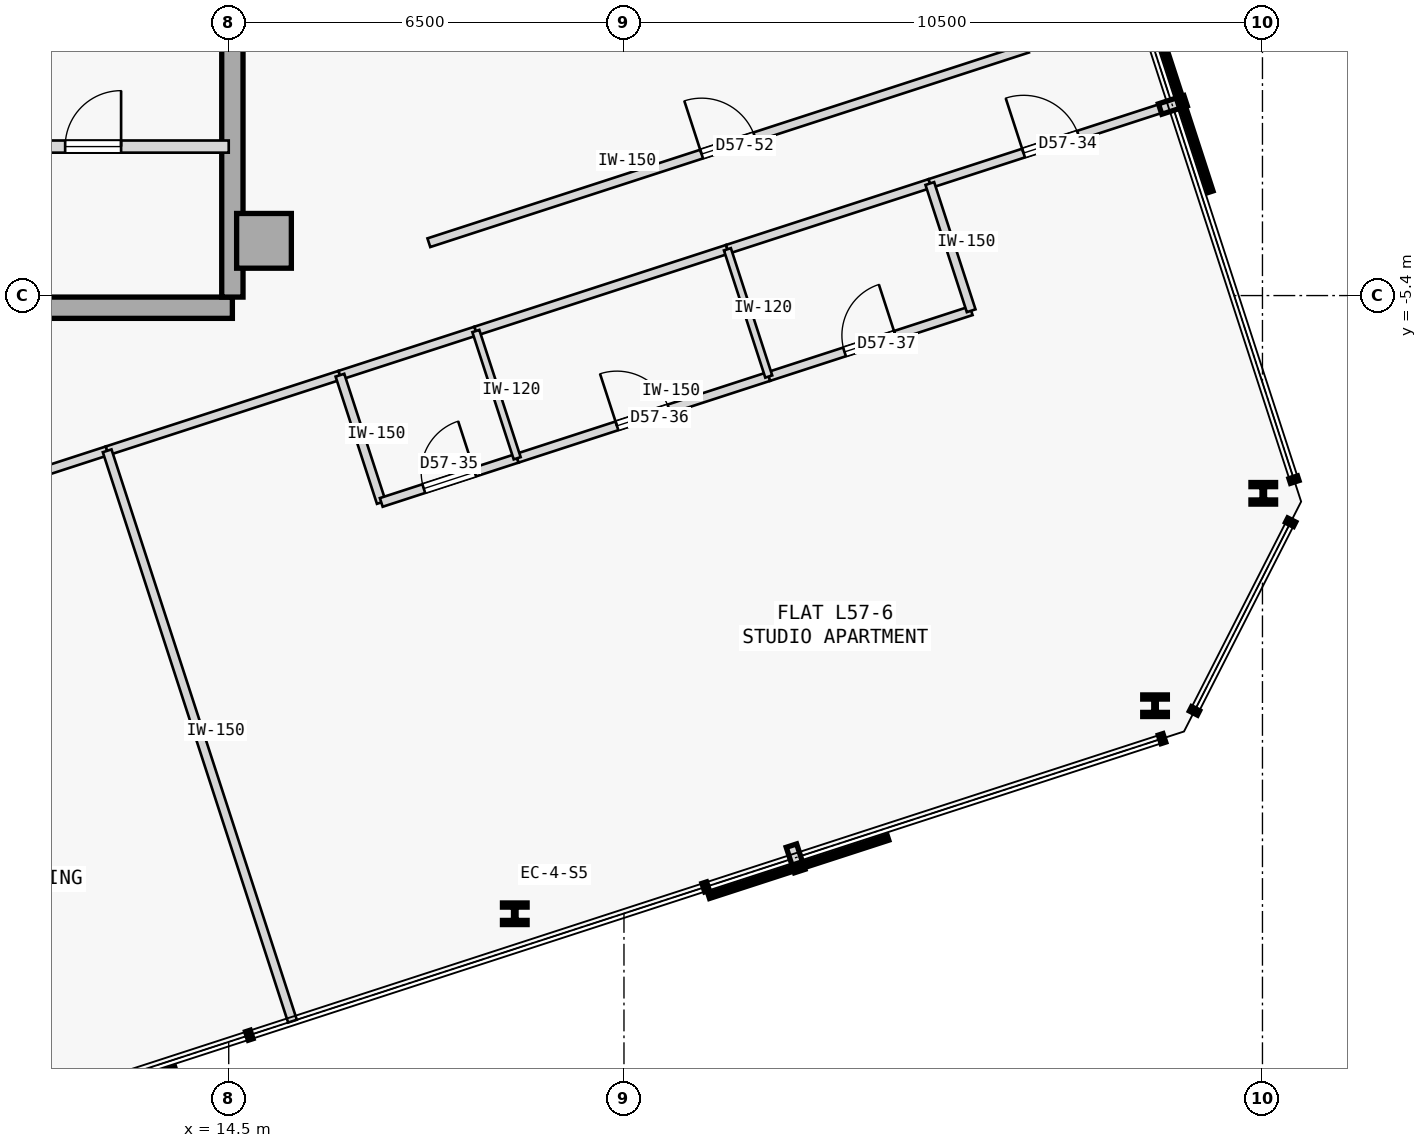
"""IFC4 building model, lengths in metres.
Left out: names, types, materials, properties, quantities, classifications, styles, units other than length and angle.
Written with IfcOpenShell. Run it as: python <this file> out.ifc"""

import sys

from ifc_helpers import new_model, si_unit, direction, frame, frame_2d, origin, origin_2d, place, context, subcontext, project, spatial, rectangle, i_section, extrude, element, fill, save


model = new_model("IFC4")
c1 = context("Model", 3, precision=1e-05, world=origin(), true_north=direction((0.0, 1.0)))
c2 = subcontext(c1, "Body", "Model", "MODEL_VIEW")
j1 = project(units=[si_unit("LENGTHUNIT", "METRE"), si_unit("PLANEANGLEUNIT", "RADIAN")], contexts=[c1])
p1 = place(None, origin())
s1 = spatial("IfcSite", under=j1, at=p1, CompositionType="ELEMENT")
p2 = place(p1, origin())
s2 = spatial("IfcBuilding", under=s1, at=p2, CompositionType="ELEMENT")
p3 = place(p2, frame((0.0, 0.0, 217.6)))
s3 = spatial("IfcBuildingStorey", under=s2, at=p3, CompositionType="ELEMENT", Elevation=217.6)
p4 = place(p3, frame((15.08, -4.5, 0.0), z_axis=(0.0, 0.0, 1.0), x_axis=(1.0, 0.0, 0.0)))
e1 = element("IfcColumn", 1, at=p4, inside=s3, PredefinedType="COLUMN", context=c2, shape_type="SweptSolid", body=[
    extrude(rectangle(XDim=0.9, YDim=0.9, at=origin_2d()), origin(), (0.0, 0.0, 1.0), 3.35),
])
p5 = place(p3, frame((3.7, -5.6, 0.0), z_axis=(0.0, 0.0, 1.0), x_axis=(1.0, 0.0, 0.0)))
e2 = element("IfcWall", 2, at=p5, inside=s3, PredefinedType="SHEAR", context=c2, shape_type="SweptSolid", body=[
    extrude(rectangle(XDim=10.86, YDim=0.35, at=frame_2d((5.43, 0.0))), origin(), (0.0, 0.0, 1.0), 3.125),
])
p6 = place(p3, frame((14.56, -5.425, 0.0), z_axis=(0.0, 0.0, 1.0), x_axis=(0.0, 1.0, 0.0)))
e3 = element("IfcWall", 3, at=p6, inside=s3, PredefinedType="SHEAR", context=c2, shape_type="SweptSolid", body=[
    extrude(rectangle(XDim=10.85, YDim=0.35, at=frame_2d((5.425, 0.0))), origin(), (0.0, 0.0, 1.0), 3.125),
])
for number, where, z_axis, x_axis in (
    (4, (19.204, -15.566, 0.0), (0.0, 0.0, 1.0), (1.0, 0.0, 0.0)),
    (5, (29.734, -12.145, 0.0), (0.0, 0.0, 1.0), (1.0, 0.0, 0.0)),
    (6, (31.513, -8.652, 0.0), (0.0, 0.0, 1.0), (1.0, 0.0, 0.0)),
):
    element("IfcColumn", number, at=place(p3, frame(where, z_axis=z_axis, x_axis=x_axis)), inside=s3, PredefinedType="COLUMN", context=c2, shape_type="SweptSolid", body=[
        extrude(i_section(OverallWidth=0.405, OverallDepth=0.355, WebThickness=0.042, FlangeThickness=0.068, FilletRadius=0.015, at=origin_2d()), origin(), (0.0, 0.0, 1.0), 3.35),
    ])
p7 = place(p3, frame((3.7, -2.95, 0.0), z_axis=(0.0, 0.0, 1.0), x_axis=(1.0, 0.0, 0.0)))
e7 = element("IfcWall", 7, at=p7, inside=s3, PredefinedType="STANDARD", context=c2, shape_type="SweptSolid", body=[
    extrude(rectangle(XDim=10.8, YDim=0.2, at=frame_2d((5.4, 0.0))), origin(), (0.0, 0.0, 1.0), 3.125),
])
p8 = place(p7, frame((0.53, 0.0, 0.0)))
e8 = element("IfcOpeningElement", 8, at=p8, cuts=e7, PredefinedType="OPENING", context=c2, shape_type="SweptSolid", body=[
    extrude(rectangle(XDim=1.1, YDim=2.15, at=frame_2d((0.55, 1.075))), frame((0.0, 0.11, 0.0), z_axis=(0.0, -1.0, 0.0), x_axis=(1.0, 0.0, 0.0)), (0.0, 0.0, 1.0), 0.22),
])
p9 = place(p7, frame((3.79, 0.0, 0.0)))
e9 = element("IfcOpeningElement", 9, at=p9, cuts=e7, PredefinedType="OPENING", context=c2, shape_type="SweptSolid", body=[
    extrude(rectangle(XDim=0.92, YDim=2.15, at=frame_2d((0.46, 1.075))), frame((0.0, 0.11, 0.0), z_axis=(0.0, -1.0, 0.0), x_axis=(1.0, 0.0, 0.0)), (0.0, 0.0, 1.0), 0.22),
])
p10 = place(p7, frame((8.11, 0.0, 0.0)))
e10 = element("IfcOpeningElement", 10, at=p10, cuts=e7, PredefinedType="OPENING", context=c2, shape_type="SweptSolid", body=[
    extrude(rectangle(XDim=0.92, YDim=2.15, at=frame_2d((0.46, 1.075))), frame((0.0, 0.11, 0.0), z_axis=(0.0, -1.0, 0.0), x_axis=(1.0, 0.0, 0.0)), (0.0, 0.0, 1.0), 0.22),
])
p11 = place(p3, frame((6.926, -9.765, 0.0), z_axis=(0.0, 0.0, 1.0), x_axis=(0.951054878391, 0.30902203528, 0.0)))
e11 = element("IfcWall", 11, at=p11, inside=s3, PredefinedType="PARTITIONING", context=c2, shape_type="SweptSolid", body=[
    extrude(rectangle(XDim=5.862, YDim=0.15, at=frame_2d((2.931, 0.0))), origin(), (0.0, 0.0, 1.0), 3.125),
])
p12 = place(p11, frame((2.456, 0.0, 0.0)))
e12 = element("IfcOpeningElement", 12, at=p12, cuts=e11, PredefinedType="OPENING", context=c2, shape_type="SweptSolid", body=[
    extrude(rectangle(XDim=0.95, YDim=2.15, at=frame_2d((0.475, 1.075))), frame((0.0, 0.085, 0.0), z_axis=(0.0, -1.0, 0.0), x_axis=(1.0, 0.0, 0.0)), (0.0, 0.0, 1.0), 0.17),
])
p13 = place(p3, frame((12.501, -7.953, 0.0), z_axis=(0.0, 0.0, 1.0), x_axis=(0.951046103464, 0.309049039936, 0.0)))
e13 = element("IfcWall", 13, at=p13, inside=s3, PredefinedType="PARTITIONING", context=c2, shape_type="SweptSolid", body=[
    extrude(rectangle(XDim=4.025, YDim=0.15, at=frame_2d((2.012, 0.0))), origin(), (0.0, 0.0, 1.0), 3.125),
])
p14 = place(p3, frame((26.03, -3.557, 0.0), z_axis=(0.0, 0.0, 1.0), x_axis=(0.951050334989, 0.309036017832, 0.0)))
e14 = element("IfcWall", 14, at=p14, inside=s3, PredefinedType="PARTITIONING", context=c2, shape_type="SweptSolid", body=[
    extrude(rectangle(XDim=4.191, YDim=0.15, at=frame_2d((2.095, 0.0))), origin(), (0.0, 0.0, 1.0), 3.125),
])
p15 = place(p14, frame((1.621, 0.0, 0.0)))
e15 = element("IfcOpeningElement", 15, at=p15, cuts=e14, PredefinedType="OPENING", context=c2, shape_type="SweptSolid", body=[
    extrude(rectangle(XDim=0.95, YDim=2.15, at=frame_2d((0.475, 1.075))), frame((0.0, 0.085, 0.0), z_axis=(0.0, -1.0, 0.0), x_axis=(1.0, 0.0, 0.0)), (0.0, 0.0, 1.0), 0.17),
])
p16 = place(p3, frame((16.329, -6.709, 0.0), z_axis=(0.0, 0.0, 1.0), x_axis=(0.951076048914, 0.308956872689, 0.0)))
e16 = element("IfcWall", 16, at=p16, inside=s3, PredefinedType="PARTITIONING", context=c2, shape_type="SweptSolid", body=[
    extrude(rectangle(XDim=2.35, YDim=0.15, at=frame_2d((1.175, 0.0))), origin(), (0.0, 0.0, 1.0), 3.125),
])
p17 = place(p3, frame((18.564, -5.983, 0.0), z_axis=(0.0, 0.0, 1.0), x_axis=(0.951052627573, 0.309028962374, 0.0)))
e17 = element("IfcWall", 17, at=p17, inside=s3, PredefinedType="PARTITIONING", context=c2, shape_type="SweptSolid", body=[
    extrude(rectangle(XDim=4.35, YDim=0.15, at=frame_2d((2.175, 0.0))), origin(), (0.0, 0.0, 1.0), 3.125),
])
p18 = place(p3, frame((22.701, -4.639, 0.0), z_axis=(0.0, 0.0, 1.0), x_axis=(0.951062257173, 0.308999325213, 0.0)))
e18 = element("IfcWall", 18, at=p18, inside=s3, PredefinedType="PARTITIONING", context=c2, shape_type="SweptSolid", body=[
    extrude(rectangle(XDim=3.5, YDim=0.15, at=frame_2d((1.75, 0.0))), origin(), (0.0, 0.0, 1.0), 3.125),
])
p19 = place(p3, frame((17.791, -4.531, 0.0), z_axis=(0.0, 0.0, 1.0), x_axis=(0.951056769902, 0.309016213852, 0.0)))
e19 = element("IfcWall", 19, at=p19, inside=s3, PredefinedType="PARTITIONING", context=c2, shape_type="SweptSolid", body=[
    extrude(rectangle(XDim=10.352, YDim=0.15, at=frame_2d((5.176, 0.0))), origin(), (0.0, 0.0, 1.0), 3.125),
])
p20 = place(p19, frame((4.716, 0.0, 0.0)))
e20 = element("IfcOpeningElement", 20, at=p20, cuts=e19, PredefinedType="OPENING", context=c2, shape_type="SweptSolid", body=[
    extrude(rectangle(XDim=0.92, YDim=2.15, at=frame_2d((0.46, 1.075))), frame((0.0, 0.085, 0.0), z_axis=(0.0, -1.0, 0.0), x_axis=(1.0, 0.0, 0.0)), (0.0, 0.0, 1.0), 0.17),
])
p21 = place(p3, frame((15.548, -17.333, 0.0), z_axis=(0.0, 0.0, 1.0), x_axis=(-0.308999867152, 0.951062081097, 0.0)))
e21 = element("IfcWall", 21, at=p21, inside=s3, PredefinedType="PARTITIONING", context=c2, shape_type="SweptSolid", body=[
    extrude(rectangle(XDim=9.862, YDim=0.15, at=frame_2d((4.931, 0.0))), origin(), (0.0, 0.0, 1.0), 3.125),
])
p22 = place(p3, frame((17.009, -8.802, 0.0), z_axis=(0.0, 0.0, 1.0), x_axis=(-0.309028364152, 0.951052821956, 0.0)))
e22 = element("IfcWall", 22, at=p22, inside=s3, PredefinedType="PARTITIONING", context=c2, shape_type="SweptSolid", body=[
    extrude(rectangle(XDim=2.2, YDim=0.15, at=frame_2d((1.1, 0.0))), origin(), (0.0, 0.0, 1.0), 3.125),
])
p23 = place(p3, frame((17.009, -8.802, 0.0), z_axis=(0.0, 0.0, 1.0), x_axis=(0.951035595692, 0.309081373955, 0.0)))
e23 = element("IfcWall", 23, at=p23, inside=s3, PredefinedType="PARTITIONING", context=c2, shape_type="SweptSolid", body=[
    extrude(rectangle(XDim=2.35, YDim=0.15, at=frame_2d((1.175, 0.0))), origin(), (0.0, 0.0, 1.0), 3.125),
])
p24 = place(p23, frame((0.735, 0.0, 0.0)))
e24 = element("IfcOpeningElement", 24, at=p24, cuts=e23, PredefinedType="OPENING", context=c2, shape_type="SweptSolid", body=[
    extrude(rectangle(XDim=0.88, YDim=2.15, at=frame_2d((0.44, 1.075))), frame((0.0, 0.085, 0.0), z_axis=(0.0, -1.0, 0.0), x_axis=(1.0, 0.0, 0.0)), (0.0, 0.0, 1.0), 0.17),
])
p25 = place(p3, frame((19.244, -8.075, 0.0), z_axis=(0.0, 0.0, 1.0), x_axis=(0.951057987102, 0.309012467661, 0.0)))
e25 = element("IfcWall", 25, at=p25, inside=s3, PredefinedType="PARTITIONING", context=c2, shape_type="SweptSolid", body=[
    extrude(rectangle(XDim=4.35, YDim=0.15, at=frame_2d((2.175, 0.0))), origin(), (0.0, 0.0, 1.0), 3.125),
])
p26 = place(p25, frame((1.725, 0.0, 0.0)))
e26 = element("IfcOpeningElement", 26, at=p26, cuts=e25, PredefinedType="OPENING", context=c2, shape_type="SweptSolid", body=[
    extrude(rectangle(XDim=0.9, YDim=2.15, at=frame_2d((0.45, 1.075))), frame((0.0, 0.085, 0.0), z_axis=(0.0, -1.0, 0.0), x_axis=(1.0, 0.0, 0.0)), (0.0, 0.0, 1.0), 0.17),
])
p27 = place(p3, frame((23.381, -6.731, 0.0), z_axis=(0.0, 0.0, 1.0), x_axis=(0.951055596592, 0.309019824916, 0.0)))
e27 = element("IfcWall", 27, at=p27, inside=s3, PredefinedType="PARTITIONING", context=c2, shape_type="SweptSolid", body=[
    extrude(rectangle(XDim=3.5, YDim=0.15, at=frame_2d((1.75, 0.0))), origin(), (0.0, 0.0, 1.0), 3.125),
])
p28 = place(p27, frame((1.31, 0.0, 0.0)))
e28 = element("IfcOpeningElement", 28, at=p28, cuts=e27, PredefinedType="OPENING", context=c2, shape_type="SweptSolid", body=[
    extrude(rectangle(XDim=0.88, YDim=2.15, at=frame_2d((0.44, 1.075))), frame((0.0, 0.085, 0.0), z_axis=(0.0, -1.0, 0.0), x_axis=(1.0, 0.0, 0.0)), (0.0, 0.0, 1.0), 0.17),
])
p29 = place(p3, frame((26.709, -5.65, 0.0), z_axis=(0.0, 0.0, 1.0), x_axis=(-0.308960600764, 0.951074837842, 0.0)))
e29 = element("IfcWall", 29, at=p29, inside=s3, PredefinedType="PARTITIONING", context=c2, shape_type="SweptSolid", body=[
    extrude(rectangle(XDim=2.2, YDim=0.15, at=frame_2d((1.1, 0.0))), origin(), (0.0, 0.0, 1.0), 3.125),
])
for number, where, z_axis, x_axis in (
    (30, (19.244, -8.075, 0.0), (0.0, 0.0, 1.0), (-0.309, 0.951, 0.0)),
    (31, (23.381, -6.731, 0.0), (0.0, 0.0, 1.0), (-0.309, 0.951, 0.0)),
):
    element("IfcWall", number, at=place(p3, frame(where, z_axis=z_axis, x_axis=x_axis)), inside=s3, PredefinedType="PARTITIONING", context=c2, shape_type="SweptSolid", body=[
        extrude(rectangle(XDim=2.2, YDim=0.12, at=frame_2d((1.1, 0.0))), origin(), (0.0, 0.0, 1.0), 3.125),
    ])
p30 = place(p10, origin())
e32 = element("IfcDoor", 32, at=p30, inside=s3, OperationType="SINGLE_SWING_RIGHT", PredefinedType="DOOR", context=c2, shape_type="SweptSolid", body=[
    extrude(rectangle(XDim=0.92, YDim=2.15, at=frame_2d((0.46, 1.075))), frame((0.0, 0.025, 0.0), z_axis=(0.0, -1.0, 0.0), x_axis=(1.0, 0.0, 0.0)), (0.0, 0.0, 1.0), 0.05),
])
fill(e10, e32)
p31 = place(p15, origin())
e33 = element("IfcDoor", 33, at=p31, inside=s3, OperationType="SINGLE_SWING_LEFT", PredefinedType="DOOR", context=c2, shape_type="SweptSolid", body=[
    extrude(rectangle(XDim=0.95, YDim=2.15, at=frame_2d((0.475, 1.075))), frame((0.0, 0.025, 0.0), z_axis=(0.0, -1.0, 0.0), x_axis=(1.0, 0.0, 0.0)), (0.0, 0.0, 1.0), 0.05),
])
fill(e15, e33)
p32 = place(p24, origin())
e34 = element("IfcDoor", 34, at=p32, inside=s3, OperationType="SINGLE_SWING_RIGHT", PredefinedType="DOOR", context=c2, shape_type="SweptSolid", body=[
    extrude(rectangle(XDim=0.88, YDim=2.15, at=frame_2d((0.44, 1.075))), frame((0.0, 0.025, 0.0), z_axis=(0.0, -1.0, 0.0), x_axis=(1.0, 0.0, 0.0)), (0.0, 0.0, 1.0), 0.05),
])
fill(e24, e34)
p33 = place(p26, origin())
e35 = element("IfcDoor", 35, at=p33, inside=s3, OperationType="SINGLE_SWING_LEFT", PredefinedType="DOOR", context=c2, shape_type="SweptSolid", body=[
    extrude(rectangle(XDim=0.9, YDim=2.15, at=frame_2d((0.45, 1.075))), frame((0.0, 0.025, 0.0), z_axis=(0.0, -1.0, 0.0), x_axis=(1.0, 0.0, 0.0)), (0.0, 0.0, 1.0), 0.05),
])
fill(e26, e35)
p34 = place(p28, origin())
e36 = element("IfcDoor", 36, at=p34, inside=s3, OperationType="SINGLE_SWING_RIGHT", PredefinedType="DOOR", context=c2, shape_type="SweptSolid", body=[
    extrude(rectangle(XDim=0.88, YDim=2.15, at=frame_2d((0.44, 1.075))), frame((0.0, 0.025, 0.0), z_axis=(0.0, -1.0, 0.0), x_axis=(1.0, 0.0, 0.0)), (0.0, 0.0, 1.0), 0.05),
])
fill(e28, e36)
p35 = place(p20, origin())
e37 = element("IfcDoor", 37, at=p35, inside=s3, OperationType="SINGLE_SWING_LEFT", PredefinedType="DOOR", context=c2, shape_type="SweptSolid", body=[
    extrude(rectangle(XDim=0.92, YDim=2.15, at=frame_2d((0.46, 1.075))), frame((0.0, 0.025, 0.0), z_axis=(0.0, -1.0, 0.0), x_axis=(1.0, 0.0, 0.0)), (0.0, 0.0, 1.0), 0.05),
])
fill(e20, e37)
save(model, sys.argv[1])
